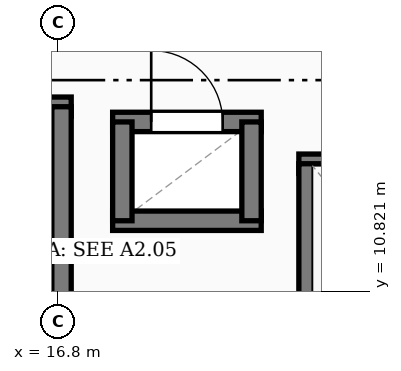
"""IFC4 building model, lengths in metres.
Left out: names, types, materials, properties, quantities, classifications, styles, units other than length and angle.
Written with IfcOpenShell. Run it as: python <this file> out.ifc"""

import sys

from ifc_helpers import new_model, si_unit, direction, frame, frame_2d, origin, place, context, subcontext, project, spatial, rectangle, extrude, element, fill, save


model = new_model("IFC4")
c1 = context("Model", 3, precision=1e-05, world=origin(), true_north=direction((0.0, 1.0)))
c2 = subcontext(c1, "Body", "Model", "MODEL_VIEW")
j1 = project(units=[si_unit("LENGTHUNIT", "METRE"), si_unit("PLANEANGLEUNIT", "RADIAN")], contexts=[c1])
p1 = place(None, origin())
s1 = spatial("IfcSite", under=j1, at=p1, CompositionType="ELEMENT")
p2 = place(p1, origin())
s2 = spatial("IfcBuilding", under=s1, at=p2, CompositionType="ELEMENT")
p3 = place(p2, frame((0.0, 0.0, -4.2)))
s3 = spatial("IfcBuildingStorey", under=s2, at=p3, CompositionType="ELEMENT", Elevation=-4.2)
p4 = place(p3, frame((8.752, 13.25, -0.4), z_axis=(0.0, 0.0, 1.0), x_axis=(1.0, 0.0, 0.0)))
e1 = element("IfcWall", 1, at=p4, inside=s3, PredefinedType="SOLIDWALL", context=c2, shape_type="SweptSolid", body=[
    extrude(rectangle(XDim=8.225, YDim=0.255, at=frame_2d((4.113, 0.0))), origin(), (0.0, 0.0, 1.0), 4.25),
])
p5 = place(p4, frame((0.35, 0.0, 0.4)))
e2 = element("IfcOpeningElement", 2, at=p5, cuts=e1, PredefinedType="OPENING", context=c2, shape_type="SweptSolid", body=[
    extrude(rectangle(XDim=1.25, YDim=2.2, at=frame_2d((0.625, 1.1))), frame((0.0, 0.137, 0.0), z_axis=(0.0, -1.0, 0.0), x_axis=(1.0, 0.0, 0.0)), (0.0, 0.0, 1.0), 0.275),
])
p6 = place(p3, frame((16.85, 9.38, -0.4), z_axis=(0.0, 0.0, 1.0), x_axis=(0.0, 1.0, 0.0)))
e3 = element("IfcWall", 3, at=p6, inside=s3, PredefinedType="SOLIDWALL", context=c2, shape_type="SweptSolid", body=[
    extrude(rectangle(XDim=3.87, YDim=0.255, at=frame_2d((1.935, 0.0))), origin(), (0.0, 0.0, 1.0), 4.25),
])
p7 = place(p3, frame((19.972, 12.5, -0.4), z_axis=(0.0, 0.0, 1.0), x_axis=(1.0, 0.0, 0.0)))
e4 = element("IfcWall", 4, at=p7, inside=s3, PredefinedType="SOLIDWALL", context=c2, shape_type="SweptSolid", body=[
    extrude(rectangle(XDim=2.455, YDim=0.255, at=frame_2d((1.228, 0.0))), origin(), (0.0, 0.0, 1.0), 4.25),
])
p8 = place(p7, frame((0.677, 0.0, 0.4)))
e5 = element("IfcOpeningElement", 5, at=p8, cuts=e4, PredefinedType="OPENING", context=c2, shape_type="SweptSolid", body=[
    extrude(rectangle(XDim=1.1, YDim=2.15, at=frame_2d((0.55, 1.075))), frame((0.0, 0.137, 0.0), z_axis=(0.0, -1.0, 0.0), x_axis=(1.0, 0.0, 0.0)), (0.0, 0.0, 1.0), 0.275),
])
p9 = place(p3, frame((20.1, 9.9, -0.4), z_axis=(0.0, 0.0, 1.0), x_axis=(0.0, 1.0, 0.0)))
e6 = element("IfcWall", 6, at=p9, inside=s3, PredefinedType="SOLIDWALL", context=c2, shape_type="SweptSolid", body=[
    extrude(rectangle(XDim=2.6, YDim=0.255, at=frame_2d((1.3, 0.0))), origin(), (0.0, 0.0, 1.0), 4.25),
])
p10 = place(p3, frame((17.522, 11.75, -0.4), z_axis=(0.0, 0.0, 1.0), x_axis=(1.0, 0.0, 0.0)))
e7 = element("IfcWall", 7, at=p10, inside=s3, PredefinedType="SOLIDWALL", context=c2, shape_type="SweptSolid", body=[
    extrude(rectangle(XDim=1.955, YDim=0.255, at=frame_2d((0.978, 0.0))), origin(), (0.0, 0.0, 1.0), 4.25),
])
p11 = place(p3, frame((17.522, 13.05, -0.4), z_axis=(0.0, 0.0, 1.0), x_axis=(1.0, 0.0, 0.0)))
e8 = element("IfcWall", 8, at=p11, inside=s3, PredefinedType="SOLIDWALL", context=c2, shape_type="SweptSolid", body=[
    extrude(rectangle(XDim=1.955, YDim=0.255, at=frame_2d((0.978, 0.0))), origin(), (0.0, 0.0, 1.0), 4.25),
])
p12 = place(p11, frame((0.508, 0.0, 0.4)))
e9 = element("IfcOpeningElement", 9, at=p12, cuts=e8, PredefinedType="OPENING", context=c2, shape_type="SweptSolid", body=[
    extrude(rectangle(XDim=0.94, YDim=2.1, at=frame_2d((0.47, 1.05))), frame((0.0, 0.137, 0.0), z_axis=(0.0, -1.0, 0.0), x_axis=(1.0, 0.0, 0.0)), (0.0, 0.0, 1.0), 0.275),
])
for number, where, z_axis, x_axis in (
    (10, (17.65, 11.75, -0.4), (0.0, 0.0, 1.0), (0.0, 1.0, 0.0)),
    (11, (19.35, 11.75, -0.4), (0.0, 0.0, 1.0), (0.0, 1.0, 0.0)),
):
    element("IfcWall", number, at=place(p3, frame(where, z_axis=z_axis, x_axis=x_axis)), inside=s3, PredefinedType="SOLIDWALL", context=c2, shape_type="SweptSolid", body=[
        extrude(rectangle(XDim=1.3, YDim=0.255, at=frame_2d((0.65, 0.0))), origin(), (0.0, 0.0, 1.0), 4.25),
    ])
p13 = place(p12, origin())
e12 = element("IfcDoor", 12, at=p13, inside=s3, OperationType="SINGLE_SWING_LEFT", PredefinedType="DOOR", context=c2, shape_type="SweptSolid", body=[
    extrude(rectangle(XDim=0.94, YDim=2.1, at=frame_2d((0.47, 1.05))), frame((0.0, 0.025, 0.0), z_axis=(0.0, -1.0, 0.0), x_axis=(1.0, 0.0, 0.0)), (0.0, 0.0, 1.0), 0.05),
])
fill(e9, e12)
save(model, sys.argv[1])
